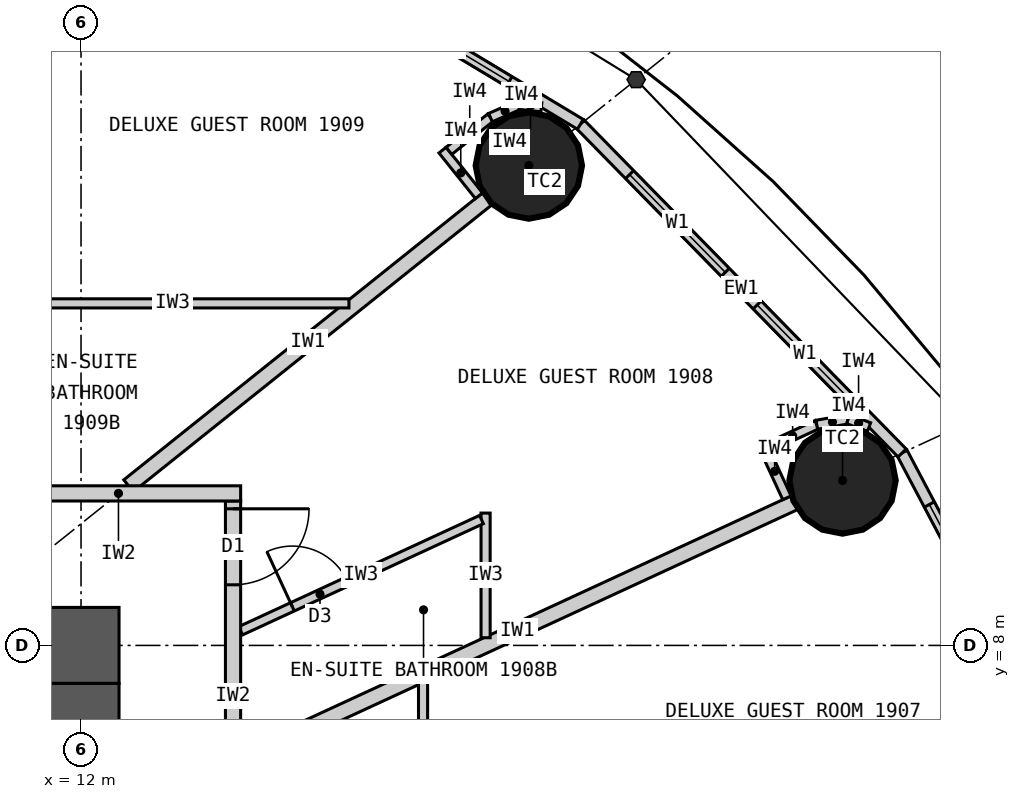
"""IFC4 building model, lengths in metres.
Left out: names, types, materials, properties, quantities, classifications, styles, units other than length and angle.
Written with IfcOpenShell. Run it as: python <this file> out.ifc"""

import sys

from ifc_helpers import new_model, si_unit, direction, frame, frame_2d, origin, origin_2d, place, context, subcontext, project, spatial, rectangle, circle, extrude, element, fill, save


model = new_model("IFC4")
c1 = context("Model", 3, precision=1e-05, world=origin(), true_north=direction((0.0, 1.0)))
c2 = subcontext(c1, "Body", "Model", "MODEL_VIEW")
j1 = project(units=[si_unit("LENGTHUNIT", "METRE"), si_unit("PLANEANGLEUNIT", "RADIAN")], contexts=[c1])
p1 = place(None, origin())
s1 = spatial("IfcSite", under=j1, at=p1, CompositionType="ELEMENT")
p2 = place(p1, origin())
s2 = spatial("IfcBuilding", under=s1, at=p2, CompositionType="ELEMENT")
p3 = place(p2, frame((0.0, 0.0, 77.1)))
s3 = spatial("IfcBuildingStorey", under=s2, at=p3, CompositionType="ELEMENT", Elevation=77.1)
for number, where, z_axis, x_axis in (
    (1, (22.019, 10.17, 0.0), (0.0, 0.0, 1.0), (1.0, 0.0, 0.0)),
    (2, (17.892, 14.313, 0.0), (0.0, 0.0, 1.0), (1.0, 0.0, 0.0)),
):
    element("IfcColumn", number, at=place(p3, frame(where, z_axis=z_axis, x_axis=x_axis)), inside=s3, PredefinedType="COLUMN", context=c2, shape_type="SweptSolid", body=[
        extrude(circle(Radius=0.7, at=origin_2d()), origin(), (0.0, 0.0, 1.0), 3.3),
    ])
p4 = place(p3, frame((-12.5, 8.0, 0.0), z_axis=(0.0, 0.0, 1.0), x_axis=(1.0, 0.0, 0.0)))
e3 = element("IfcWall", 3, at=p4, inside=s3, PredefinedType="SHEAR", context=c2, shape_type="SweptSolid", body=[
    extrude(rectangle(XDim=25.0, YDim=1.0, at=frame_2d((12.5, 0.0))), origin(), (0.0, 0.0, 1.0), 3.3),
])
p5 = place(p4, frame((11.2, 0.0, 0.0)))
e4 = element("IfcOpeningElement", 4, at=p5, cuts=e3, PredefinedType="OPENING", context=c2, shape_type="SweptSolid", body=[
    extrude(rectangle(XDim=1.2, YDim=2.2, at=frame_2d((0.6, 1.1))), frame((0.0, 0.51, 0.0), z_axis=(0.0, -1.0, 0.0), x_axis=(1.0, 0.0, 0.0)), (0.0, 0.0, 1.0), 1.02),
])
p6 = place(p4, frame((18.8, 0.0, 0.0)))
e5 = element("IfcOpeningElement", 5, at=p6, cuts=e3, PredefinedType="OPENING", context=c2, shape_type="SweptSolid", body=[
    extrude(rectangle(XDim=0.9, YDim=2.2, at=frame_2d((0.45, 1.1))), frame((0.0, 0.51, 0.0), z_axis=(0.0, -1.0, 0.0), x_axis=(1.0, 0.0, 0.0)), (0.0, 0.0, 1.0), 1.02),
])
p7 = place(p3, frame((12.0, -7.5, 0.0), z_axis=(0.0, 0.0, 1.0), x_axis=(0.0, 1.0, 0.0)))
e6 = element("IfcWall", 6, at=p7, inside=s3, PredefinedType="SHEAR", context=c2, shape_type="SweptSolid", body=[
    extrude(rectangle(XDim=15.0, YDim=1.0, at=frame_2d((7.5, 0.0))), origin(), (0.0, 0.0, 1.0), 3.3),
])
p8 = place(p7, frame((6.6, 0.0, 0.0)))
e7 = element("IfcOpeningElement", 7, at=p8, cuts=e6, PredefinedType="OPENING", context=c2, shape_type="SweptSolid", body=[
    extrude(rectangle(XDim=1.8, YDim=2.2, at=frame_2d((0.9, 1.1))), frame((0.0, 0.51, 0.0), z_axis=(0.0, -1.0, 0.0), x_axis=(1.0, 0.0, 0.0)), (0.0, 0.0, 1.0), 1.02),
])
p9 = place(p3, frame((25.482, 5.462, 0.0), z_axis=(0.0, 0.0, 1.0), x_axis=(-0.467296867008, 0.884100468321, 0.0)))
e8 = element("IfcWall", 8, at=p9, inside=s3, PredefinedType="ELEMENTEDWALL", context=c2, shape_type="SweptSolid", body=[
    extrude(rectangle(XDim=5.734, YDim=0.15, at=frame_2d((2.867, 0.0))), origin(), (0.0, 0.0, 1.0), 3.12),
])
p10 = place(p9, frame((0.767, 0.0, 0.9)))
e9 = element("IfcOpeningElement", 9, at=p10, cuts=e8, PredefinedType="OPENING", context=c2, shape_type="SweptSolid", body=[
    extrude(rectangle(XDim=1.8, YDim=1.9, at=frame_2d((0.9, 0.95))), frame((0.0, 0.085, 0.0), z_axis=(0.0, -1.0, 0.0), x_axis=(1.0, 0.0, 0.0)), (0.0, 0.0, 1.0), 0.17),
])
p11 = place(p9, frame((3.167, 0.0, 0.9)))
e10 = element("IfcOpeningElement", 10, at=p11, cuts=e8, PredefinedType="OPENING", context=c2, shape_type="SweptSolid", body=[
    extrude(rectangle(XDim=1.8, YDim=1.9, at=frame_2d((0.9, 0.95))), frame((0.0, 0.085, 0.0), z_axis=(0.0, -1.0, 0.0), x_axis=(1.0, 0.0, 0.0)), (0.0, 0.0, 1.0), 0.17),
])
p12 = place(p3, frame((22.803, 10.532, 0.0), z_axis=(0.0, 0.0, 1.0), x_axis=(-0.699602905915, 0.714531856557, 0.0)))
e11 = element("IfcWall", 11, at=p12, inside=s3, PredefinedType="ELEMENTEDWALL", context=c2, shape_type="SweptSolid", body=[
    extrude(rectangle(XDim=6.051, YDim=0.15, at=frame_2d((3.025, 0.0))), origin(), (0.0, 0.0, 1.0), 3.12),
])
p13 = place(p12, frame((0.926, 0.0, 0.9)))
e12 = element("IfcOpeningElement", 12, at=p13, cuts=e11, PredefinedType="OPENING", context=c2, shape_type="SweptSolid", body=[
    extrude(rectangle(XDim=1.8, YDim=1.9, at=frame_2d((0.9, 0.95))), frame((0.0, 0.085, 0.0), z_axis=(0.0, -1.0, 0.0), x_axis=(1.0, 0.0, 0.0)), (0.0, 0.0, 1.0), 0.17),
])
p14 = place(p12, frame((3.325, 0.0, 0.9)))
e13 = element("IfcOpeningElement", 13, at=p14, cuts=e11, PredefinedType="OPENING", context=c2, shape_type="SweptSolid", body=[
    extrude(rectangle(XDim=1.8, YDim=1.9, at=frame_2d((0.9, 0.95))), frame((0.0, 0.085, 0.0), z_axis=(0.0, -1.0, 0.0), x_axis=(1.0, 0.0, 0.0)), (0.0, 0.0, 1.0), 0.17),
])
p15 = place(p3, frame((18.57, 14.856, 0.0), z_axis=(0.0, 0.0, 1.0), x_axis=(-0.856983180864, 0.515344377787, 0.0)))
e14 = element("IfcWall", 14, at=p15, inside=s3, PredefinedType="ELEMENTEDWALL", context=c2, shape_type="SweptSolid", body=[
    extrude(rectangle(XDim=6.386, YDim=0.15, at=frame_2d((3.193, 0.0))), origin(), (0.0, 0.0, 1.0), 3.12),
])
p16 = place(p15, frame((1.093, 0.0, 0.9)))
e15 = element("IfcOpeningElement", 15, at=p16, cuts=e14, PredefinedType="OPENING", context=c2, shape_type="SweptSolid", body=[
    extrude(rectangle(XDim=1.8, YDim=1.9, at=frame_2d((0.9, 0.95))), frame((0.0, 0.085, 0.0), z_axis=(0.0, -1.0, 0.0), x_axis=(1.0, 0.0, 0.0)), (0.0, 0.0, 1.0), 0.17),
])
p17 = place(p15, frame((3.493, 0.0, 0.9)))
e16 = element("IfcOpeningElement", 16, at=p17, cuts=e14, PredefinedType="OPENING", context=c2, shape_type="SweptSolid", body=[
    extrude(rectangle(XDim=1.8, YDim=1.9, at=frame_2d((0.9, 0.95))), frame((0.0, 0.085, 0.0), z_axis=(0.0, -1.0, 0.0), x_axis=(1.0, 0.0, 0.0)), (0.0, 0.0, 1.0), 0.17),
])
p18 = place(p3, frame((14.1, 6.512, 0.0), z_axis=(0.0, 0.0, 1.0), x_axis=(0.907832871056, 0.419332181247, 0.0)))
e17 = element("IfcWall", 17, at=p18, inside=s3, PredefinedType="PARTITIONING", context=c2, shape_type="SweptSolid", body=[
    extrude(rectangle(XDim=8.023, YDim=0.2, at=frame_2d((4.011, 0.0))), origin(), (0.0, 0.0, 1.0), 2.32),
])
p19 = place(p3, frame((12.625, 10.1, 0.0), z_axis=(0.0, 0.0, 1.0), x_axis=(0.780892451574, 0.624665493744, 0.0)))
e18 = element("IfcWall", 18, at=p19, inside=s3, PredefinedType="PARTITIONING", context=c2, shape_type="SweptSolid", body=[
    extrude(rectangle(XDim=6.045, YDim=0.2, at=frame_2d((3.022, 0.0))), origin(), (0.0, 0.0, 1.0), 2.32),
])
p20 = place(p3, frame((7.289, 10.1, 0.0), z_axis=(0.0, 0.0, 1.0), x_axis=(0.585198353053, 0.810890182197, 0.0)))
e19 = element("IfcWall", 19, at=p20, inside=s3, PredefinedType="PARTITIONING", context=c2, shape_type="SweptSolid", body=[
    extrude(rectangle(XDim=8.36, YDim=0.2, at=frame_2d((4.18, 0.0))), origin(), (0.0, 0.0, 1.0), 2.32),
])
p21 = place(p3, frame((16.5, 7.521, 0.0), z_axis=(0.0, 0.0, 1.0), x_axis=(0.0, -1.0, 0.0)))
e20 = element("IfcWall", 20, at=p21, inside=s3, PredefinedType="PARTITIONING", context=c2, shape_type="SweptSolid", body=[
    extrude(rectangle(XDim=2.749, YDim=0.12, at=frame_2d((1.374, 0.0))), origin(), (0.0, 0.0, 1.0), 3.12),
])
p22 = place(p3, frame((17.323, 8.101, 0.0), z_axis=(0.0, 0.0, 1.0), x_axis=(0.0, 1.0, 0.0)))
e21 = element("IfcWall", 21, at=p22, inside=s3, PredefinedType="PARTITIONING", context=c2, shape_type="SweptSolid", body=[
    extrude(rectangle(XDim=1.64, YDim=0.12, at=frame_2d((0.82, 0.0))), origin(), (0.0, 0.0, 1.0), 3.12),
])
p23 = place(p3, frame((14.1, 8.193, 0.0), z_axis=(0.0, 0.0, 1.0), x_axis=(0.907836493557, 0.419324338628, 0.0)))
e22 = element("IfcWall", 22, at=p23, inside=s3, PredefinedType="PARTITIONING", context=c2, shape_type="SweptSolid", body=[
    extrude(rectangle(XDim=3.49, YDim=0.12, at=frame_2d((1.745, 0.0))), origin(), (0.0, 0.0, 1.0), 3.12),
])
p24 = place(p23, frame((0.75, 0.0, 0.0)))
e23 = element("IfcOpeningElement", 23, at=p24, cuts=e22, PredefinedType="OPENING", context=c2, shape_type="SweptSolid", body=[
    extrude(rectangle(XDim=0.8, YDim=2.1, at=frame_2d((0.4, 1.05))), frame((0.0, 0.07, 0.0), z_axis=(0.0, -1.0, 0.0), x_axis=(1.0, 0.0, 0.0)), (0.0, 0.0, 1.0), 0.14),
])
p25 = place(p3, frame((15.525, 12.5, 0.0), z_axis=(0.0, 0.0, 1.0), x_axis=(-1.0, 0.0, 0.0)))
e24 = element("IfcWall", 24, at=p25, inside=s3, PredefinedType="PARTITIONING", context=c2, shape_type="SweptSolid", body=[
    extrude(rectangle(XDim=4.64, YDim=0.12, at=frame_2d((2.32, 0.0))), origin(), (0.0, 0.0, 1.0), 3.12),
])
p26 = place(p3, frame((14.0, 4.772, 0.0), z_axis=(0.0, 0.0, 1.0), x_axis=(0.0, 1.0, 0.0)))
e25 = element("IfcWall", 25, at=p26, inside=s3, PredefinedType="PARTITIONING", context=c2, shape_type="SweptSolid", body=[
    extrude(rectangle(XDim=5.127, YDim=0.2, at=frame_2d((2.564, 0.0))), origin(), (0.0, 0.0, 1.0), 3.12),
])
p27 = place(p26, frame((4.025, 0.0, 0.0)))
e26 = element("IfcOpeningElement", 26, at=p27, cuts=e25, PredefinedType="OPENING", context=c2, shape_type="SweptSolid", body=[
    extrude(rectangle(XDim=1.0, YDim=2.2, at=frame_2d((0.5, 1.1))), frame((0.0, 0.11, 0.0), z_axis=(0.0, -1.0, 0.0), x_axis=(1.0, 0.0, 0.0)), (0.0, 0.0, 1.0), 0.22),
])
p28 = place(p3, frame((10.885, 10.0, 0.0), z_axis=(0.0, 0.0, 1.0), x_axis=(1.0, 0.0, 0.0)))
e27 = element("IfcWall", 27, at=p28, inside=s3, PredefinedType="PARTITIONING", context=c2, shape_type="SweptSolid", body=[
    extrude(rectangle(XDim=3.215, YDim=0.2, at=frame_2d((1.607, 0.0))), origin(), (0.0, 0.0, 1.0), 3.12),
])
p29 = place(p3, frame((21.287, 9.942, 0.0), z_axis=(0.0, 0.0, 1.0), x_axis=(-0.419259891039, 0.907866258744, 0.0)))
e28 = element("IfcWall", 28, at=p29, inside=s3, PredefinedType="PARTITIONING", context=c2, shape_type="SweptSolid", body=[
    extrude(rectangle(XDim=0.768, YDim=0.12, at=frame_2d((0.384, 0.0))), origin(), (0.0, 0.0, 1.0), 3.12),
])
p30 = place(p3, frame((21.045, 10.61, 0.0), z_axis=(0.0, 0.0, 1.0), x_axis=(0.907877701396, 0.419235112208, 0.0)))
e29 = element("IfcWall", 29, at=p30, inside=s3, PredefinedType="PARTITIONING", context=c2, shape_type="SweptSolid", body=[
    extrude(rectangle(XDim=0.7, YDim=0.12, at=frame_2d((0.35, 0.0))), origin(), (0.0, 0.0, 1.0), 3.12),
])
p31 = place(p3, frame((21.68, 10.903, 0.0), z_axis=(0.0, 0.0, 1.0), x_axis=(0.985446622073, 0.169985161247, 0.0)))
e30 = element("IfcWall", 30, at=p31, inside=s3, PredefinedType="PARTITIONING", context=c2, shape_type="SweptSolid", body=[
    extrude(rectangle(XDim=0.418, YDim=0.12, at=frame_2d((0.209, 0.0))), origin(), (0.0, 0.0, 1.0), 3.12),
])
p32 = place(p3, frame((22.092, 10.974, 0.0), z_axis=(0.0, 0.0, 1.0), x_axis=(0.938428160676, -0.345474437912, 0.0)))
e31 = element("IfcWall", 31, at=p32, inside=s3, PredefinedType="PARTITIONING", context=c2, shape_type="SweptSolid", body=[
    extrude(rectangle(XDim=0.294, YDim=0.12, at=frame_2d((0.147, 0.0))), origin(), (0.0, 0.0, 1.0), 3.12),
])
p33 = place(p3, frame((17.236, 13.917, 0.0), z_axis=(0.0, 0.0, 1.0), x_axis=(-0.624695047554, 0.780868809443, 0.0)))
e32 = element("IfcWall", 32, at=p33, inside=s3, PredefinedType="PARTITIONING", context=c2, shape_type="SweptSolid", body=[
    extrude(rectangle(XDim=0.768, YDim=0.12, at=frame_2d((0.384, 0.0))), origin(), (0.0, 0.0, 1.0), 3.12),
])
p34 = place(p3, frame((16.841, 14.507, 0.0), z_axis=(0.0, 0.0, 1.0), x_axis=(0.780902834923, 0.62465251333, 0.0)))
e33 = element("IfcWall", 33, at=p34, inside=s3, PredefinedType="PARTITIONING", context=c2, shape_type="SweptSolid", body=[
    extrude(rectangle(XDim=0.7, YDim=0.12, at=frame_2d((0.35, 0.0))), origin(), (0.0, 0.0, 1.0), 3.12),
])
p35 = place(p3, frame((17.387, 14.944, 0.0), z_axis=(0.0, 0.0, 1.0), x_axis=(0.916036698064, 0.401094462441, 0.0)))
e34 = element("IfcWall", 34, at=p35, inside=s3, PredefinedType="PARTITIONING", context=c2, shape_type="SweptSolid", body=[
    extrude(rectangle(XDim=0.418, YDim=0.12, at=frame_2d((0.209, 0.0))), origin(), (0.0, 0.0, 1.0), 3.12),
])
p36 = place(p3, frame((17.77, 15.112, 0.0), z_axis=(0.0, 0.0, 1.0), x_axis=(0.993904401174, -0.110245368731, 0.0)))
e35 = element("IfcWall", 35, at=p36, inside=s3, PredefinedType="PARTITIONING", context=c2, shape_type="SweptSolid", body=[
    extrude(rectangle(XDim=0.288, YDim=0.12, at=frame_2d((0.144, 0.0))), origin(), (0.0, 0.0, 1.0), 3.12),
])
p37 = place(p11, origin())
e36 = element("IfcWindow", 36, at=p37, inside=s3, PartitioningType="SINGLE_PANEL", PredefinedType="WINDOW", context=c2, shape_type="SweptSolid", body=[
    extrude(rectangle(XDim=1.8, YDim=1.9, at=frame_2d((0.9, 0.95))), frame((0.0, 0.03, 0.0), z_axis=(0.0, -1.0, 0.0), x_axis=(1.0, 0.0, 0.0)), (0.0, 0.0, 1.0), 0.06),
])
fill(e10, e36)
p38 = place(p13, origin())
e37 = element("IfcWindow", 37, at=p38, inside=s3, PartitioningType="SINGLE_PANEL", PredefinedType="WINDOW", context=c2, shape_type="SweptSolid", body=[
    extrude(rectangle(XDim=1.8, YDim=1.9, at=frame_2d((0.9, 0.95))), frame((0.0, 0.03, 0.0), z_axis=(0.0, -1.0, 0.0), x_axis=(1.0, 0.0, 0.0)), (0.0, 0.0, 1.0), 0.06),
])
fill(e12, e37)
p39 = place(p14, origin())
e38 = element("IfcWindow", 38, at=p39, inside=s3, PartitioningType="SINGLE_PANEL", PredefinedType="WINDOW", context=c2, shape_type="SweptSolid", body=[
    extrude(rectangle(XDim=1.8, YDim=1.9, at=frame_2d((0.9, 0.95))), frame((0.0, 0.03, 0.0), z_axis=(0.0, -1.0, 0.0), x_axis=(1.0, 0.0, 0.0)), (0.0, 0.0, 1.0), 0.06),
])
fill(e13, e38)
p40 = place(p16, origin())
e39 = element("IfcWindow", 39, at=p40, inside=s3, PartitioningType="SINGLE_PANEL", PredefinedType="WINDOW", context=c2, shape_type="SweptSolid", body=[
    extrude(rectangle(XDim=1.8, YDim=1.9, at=frame_2d((0.9, 0.95))), frame((0.0, 0.03, 0.0), z_axis=(0.0, -1.0, 0.0), x_axis=(1.0, 0.0, 0.0)), (0.0, 0.0, 1.0), 0.06),
])
fill(e15, e39)
p41 = place(p24, origin())
e40 = element("IfcDoor", 40, at=p41, inside=s3, OperationType="SINGLE_SWING_LEFT", PredefinedType="DOOR", context=c2, shape_type="SweptSolid", body=[
    extrude(rectangle(XDim=0.8, YDim=2.1, at=frame_2d((0.4, 1.05))), frame((0.0, 0.025, 0.0), z_axis=(0.0, -1.0, 0.0), x_axis=(1.0, 0.0, 0.0)), (0.0, 0.0, 1.0), 0.05),
])
fill(e23, e40)
p42 = place(p27, origin())
e41 = element("IfcDoor", 41, at=p42, inside=s3, OperationType="SINGLE_SWING_RIGHT", PredefinedType="DOOR", context=c2, shape_type="SweptSolid", body=[
    extrude(rectangle(XDim=1.0, YDim=2.2, at=frame_2d((0.5, 1.1))), frame((0.0, 0.025, 0.0), z_axis=(0.0, -1.0, 0.0), x_axis=(1.0, 0.0, 0.0)), (0.0, 0.0, 1.0), 0.05),
])
fill(e26, e41)
save(model, sys.argv[1])
